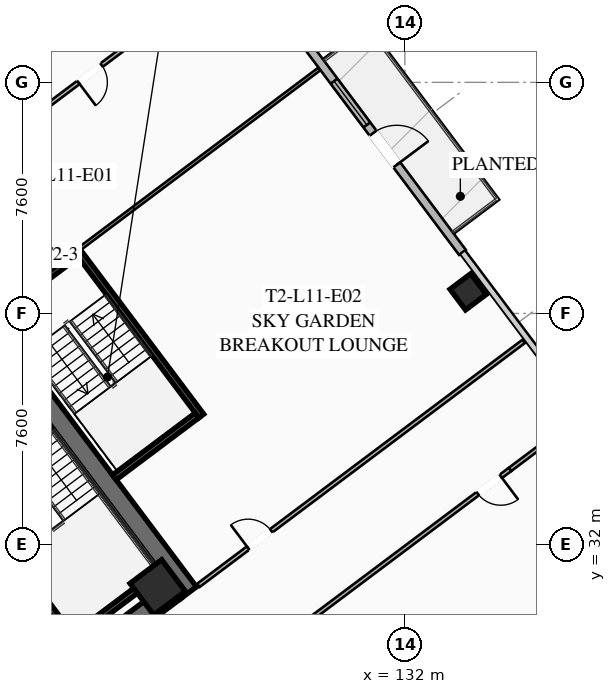
"""IFC4 building model, lengths in metres.
Left out: names, types, materials, properties, quantities, classifications, styles, units other than length and angle.
Written with IfcOpenShell. Run it as: python <this file> out.ifc"""

import sys

from ifc_helpers import new_model, si_unit, direction, frame, frame_2d, origin, origin_2d, place, context, subcontext, project, spatial, rectangle, hollow_rectangle, extrude, element, fill, save


model = new_model("IFC4")
c1 = context("Model", 3, precision=1e-05, world=origin(), true_north=direction((0.0, 1.0)))
c2 = subcontext(c1, "Body", "Model", "MODEL_VIEW")
j1 = project(units=[si_unit("LENGTHUNIT", "METRE"), si_unit("PLANEANGLEUNIT", "RADIAN")], contexts=[c1])
p1 = place(None, origin())
s1 = spatial("IfcSite", under=j1, at=p1, CompositionType="ELEMENT")
p2 = place(p1, origin())
s2 = spatial("IfcBuilding", under=s1, at=p2, CompositionType="ELEMENT")
p3 = place(p2, frame((0.0, 0.0, 45.9)))
s3 = spatial("IfcBuildingStorey", under=s2, at=p3, CompositionType="ELEMENT", Elevation=45.9)
p4 = place(p3, frame((115.524, 42.893, 0.0), z_axis=(0.0, 0.0, 1.0), x_axis=(0.600005007985, -0.799996243986, 0.0)))
e1 = element("IfcWall", 1, at=p4, inside=s3, PredefinedType="SHEAR", context=c2, shape_type="SweptSolid", body=[
    extrude(rectangle(XDim=15.6, YDim=0.65, at=frame_2d((7.8, 0.0))), origin(), (0.0, 0.0, 1.0), 3.55),
])
p5 = place(p3, frame((124.429, 30.478, 0.0), z_axis=(0.0, 0.0, 1.0), x_axis=(-0.799998028465, -0.600002628705, 0.0)))
e2 = element("IfcWall", 2, at=p5, inside=s3, PredefinedType="SHEAR", context=c2, shape_type="SweptSolid", body=[
    extrude(rectangle(XDim=14.86, YDim=0.65, at=frame_2d((7.43, 0.0))), origin(), (0.0, 0.0, 1.0), 3.55),
])
p6 = place(p5, frame((9.13, 0.0, 0.0)))
e3 = element("IfcOpeningElement", 3, at=p6, cuts=e2, PredefinedType="OPENING", context=c2, shape_type="SweptSolid", body=[
    extrude(rectangle(XDim=1.25, YDim=2.25, at=frame_2d((0.625, 1.125))), frame((0.0, 0.335, 0.0), z_axis=(0.0, -1.0, 0.0), x_axis=(1.0, 0.0, 0.0)), (0.0, 0.0, 1.0), 0.67),
])
p7 = place(p5, frame((4.08, 0.0, 0.0)))
e4 = element("IfcOpeningElement", 4, at=p7, cuts=e2, PredefinedType="OPENING", context=c2, shape_type="SweptSolid", body=[
    extrude(rectangle(XDim=1.25, YDim=2.25, at=frame_2d((0.625, 1.125))), frame((0.0, 0.335, 0.0), z_axis=(0.0, -1.0, 0.0), x_axis=(1.0, 0.0, 0.0)), (0.0, 0.0, 1.0), 0.67),
])
p8 = place(p3, frame((123.87, 30.59, 0.0), z_axis=(0.0, 0.0, 1.0), x_axis=(0.799999996291, 0.600000004945, 0.0)))
e5 = element("IfcColumn", 5, at=p8, inside=s3, PredefinedType="COLUMN", context=c2, shape_type="SweptSolid", body=[
    extrude(hollow_rectangle(XDim=1.3, YDim=1.3, WallThickness=0.05, at=origin_2d()), origin(), (0.0, 0.0, 1.0), 3.35),
])
p9 = place(p3, frame((134.08, 40.31, 0.0), z_axis=(0.0, 0.0, 1.0), x_axis=(0.799999996291, 0.600000004945, 0.0)))
e6 = element("IfcColumn", 6, at=p9, inside=s3, PredefinedType="COLUMN", context=c2, shape_type="SweptSolid", body=[
    extrude(hollow_rectangle(XDim=0.85, YDim=0.85, WallThickness=0.035, at=origin_2d()), origin(), (0.0, 0.0, 1.0), 3.35),
])
p10 = place(p3, frame((128.794, 48.408, 0.0), z_axis=(0.0, 0.0, 1.0), x_axis=(0.600004595526, -0.799996553335, 0.0)))
e7 = element("IfcWall", 7, at=p10, inside=s3, PredefinedType="SOLIDWALL", context=c2, shape_type="SweptSolid", body=[
    extrude(rectangle(XDim=8.5, YDim=0.28, at=frame_2d((4.25, 0.0))), origin(), (0.0, 0.0, 1.0), 3.35),
])
p11 = place(p10, frame((3.6, 0.0, 0.0)))
e8 = element("IfcOpeningElement", 8, at=p11, cuts=e7, PredefinedType="OPENING", context=c2, shape_type="SweptSolid", body=[
    extrude(rectangle(XDim=1.3, YDim=2.15, at=frame_2d((0.65, 1.075))), frame((0.0, 0.15, 0.0), z_axis=(0.0, -1.0, 0.0), x_axis=(1.0, 0.0, 0.0)), (0.0, 0.0, 1.0), 0.3),
])
p12 = place(p10, frame((1.46, 0.0, 0.85)))
e9 = element("IfcOpeningElement", 9, at=p12, cuts=e7, PredefinedType="OPENING", context=c2, shape_type="SweptSolid", body=[
    extrude(rectangle(XDim=1.8, YDim=1.92, at=frame_2d((0.9, 0.96))), frame((0.0, 0.15, 0.0), z_axis=(0.0, -1.0, 0.0), x_axis=(1.0, 0.0, 0.0)), (0.0, 0.0, 1.0), 0.3),
])
p13 = place(p3, frame((116.56, 34.92, 0.0), z_axis=(0.0, 0.0, 1.0), x_axis=(0.600009827119, -0.799992629566, 0.0)))
e10 = element("IfcWall", 10, at=p13, inside=s3, PredefinedType="SHEAR", context=c2, shape_type="SweptSolid", body=[
    extrude(rectangle(XDim=7.95, YDim=0.2, at=frame_2d((3.975, 0.0))), origin(), (0.0, 0.0, 1.0), 3.35),
])
p14 = place(p13, frame((0.45, 0.0, 0.0)))
e11 = element("IfcOpeningElement", 11, at=p14, cuts=e10, PredefinedType="OPENING", context=c2, shape_type="SweptSolid", body=[
    extrude(rectangle(XDim=1.15, YDim=2.2, at=frame_2d((0.575, 1.1))), frame((0.0, 0.11, 0.0), z_axis=(0.0, -1.0, 0.0), x_axis=(1.0, 0.0, 0.0)), (0.0, 0.0, 1.0), 0.22),
])
p15 = place(p3, frame((120.98, 28.86, 0.0), z_axis=(0.0, 0.0, 1.0), x_axis=(0.800039270442, 0.59994763584, 0.0)))
e12 = element("IfcWall", 12, at=p15, inside=s3, PredefinedType="SHEAR", context=c2, shape_type="SweptSolid", body=[
    extrude(rectangle(XDim=3.73, YDim=0.2, at=frame_2d((1.865, 0.0))), origin(), (0.0, 0.0, 1.0), 3.35),
])
p16 = place(p3, frame((125.304, 36.228, 0.0), z_axis=(0.0, 0.0, 1.0), x_axis=(-0.59998851072, 0.800008616831, 0.0)))
e13 = element("IfcWall", 13, at=p16, inside=s3, PredefinedType="SHEAR", context=c2, shape_type="SweptSolid", body=[
    extrude(rectangle(XDim=6.8, YDim=0.2, at=frame_2d((3.4, 0.0))), origin(), (0.0, 0.0, 1.0), 3.35),
])
p17 = place(p3, frame((121.204, 41.528, 0.0), z_axis=(0.0, 0.0, 1.0), x_axis=(-0.800017232136, -0.599977023131, 0.0)))
e14 = element("IfcWall", 14, at=p17, inside=s3, PredefinedType="SHEAR", context=c2, shape_type="SweptSolid", body=[
    extrude(rectangle(XDim=3.4, YDim=0.2, at=frame_2d((1.7, 0.0))), origin(), (0.0, 0.0, 1.0), 3.35),
])
p18 = place(p17, frame((1.975, 0.0, 0.0)))
e15 = element("IfcOpeningElement", 15, at=p18, cuts=e14, PredefinedType="OPENING", context=c2, shape_type="SweptSolid", body=[
    extrude(rectangle(XDim=1.15, YDim=2.2, at=frame_2d((0.575, 1.1))), frame((0.0, 0.11, 0.0), z_axis=(0.0, -1.0, 0.0), x_axis=(1.0, 0.0, 0.0)), (0.0, 0.0, 1.0), 0.22),
])
p19 = place(p3, frame((122.444, 34.208, 0.0), z_axis=(0.0, 0.0, 1.0), x_axis=(0.79999138319, 0.600011488909, 0.0)))
e16 = element("IfcWall", 16, at=p19, inside=s3, PredefinedType="SHEAR", context=c2, shape_type="SweptSolid", body=[
    extrude(rectangle(XDim=3.4, YDim=0.2, at=frame_2d((1.7, 0.0))), origin(), (0.0, 0.0, 1.0), 3.35),
])
p20 = place(p3, frame((98.516, 34.012, 0.0), z_axis=(0.0, 0.0, 1.0), x_axis=(0.799998035726, 0.600002619023, 0.0)))
e17 = element("IfcWall", 17, at=p20, inside=s3, PredefinedType="PARTITIONING", context=c2, shape_type="SweptSolid", body=[
    extrude(rectangle(XDim=29.83, YDim=0.135, at=frame_2d((14.915, 0.0))), origin(), (0.0, 0.0, 1.0), 2.703),
])
p21 = place(p20, frame((0.3, 0.0, 0.0)))
e18 = element("IfcOpeningElement", 18, at=p21, cuts=e17, PredefinedType="OPENING", context=c2, shape_type="SweptSolid", body=[
    extrude(rectangle(XDim=0.95, YDim=2.05, at=frame_2d((0.475, 1.025))), frame((0.0, 0.077, 0.0), z_axis=(0.0, -1.0, 0.0), x_axis=(1.0, 0.0, 0.0)), (0.0, 0.0, 1.0), 0.155),
])
p22 = place(p20, frame((10.835, 0.0, 0.0)))
e19 = element("IfcOpeningElement", 19, at=p22, cuts=e17, PredefinedType="OPENING", context=c2, shape_type="SweptSolid", body=[
    extrude(rectangle(XDim=0.95, YDim=2.05, at=frame_2d((0.475, 1.025))), frame((0.0, 0.077, 0.0), z_axis=(0.0, -1.0, 0.0), x_axis=(1.0, 0.0, 0.0)), (0.0, 0.0, 1.0), 0.155),
])
p23 = place(p20, frame((14.879, 0.0, 0.0)))
e20 = element("IfcOpeningElement", 20, at=p23, cuts=e17, PredefinedType="OPENING", context=c2, shape_type="SweptSolid", body=[
    extrude(rectangle(XDim=0.95, YDim=2.05, at=frame_2d((0.475, 1.025))), frame((0.0, 0.077, 0.0), z_axis=(0.0, -1.0, 0.0), x_axis=(1.0, 0.0, 0.0)), (0.0, 0.0, 1.0), 0.155),
])
p24 = place(p20, frame((28.58, 0.0, 0.0)))
e21 = element("IfcOpeningElement", 21, at=p24, cuts=e17, PredefinedType="OPENING", context=c2, shape_type="SweptSolid", body=[
    extrude(rectangle(XDim=0.95, YDim=2.05, at=frame_2d((0.475, 1.025))), frame((0.0, 0.077, 0.0), z_axis=(0.0, -1.0, 0.0), x_axis=(1.0, 0.0, 0.0)), (0.0, 0.0, 1.0), 0.155),
])
p25 = place(p3, frame((135.46, 34.47, 0.0), z_axis=(0.0, 0.0, 1.0), x_axis=(-0.800000982127, -0.599998690494, 0.0)))
e22 = element("IfcWall", 22, at=p25, inside=s3, PredefinedType="PARTITIONING", context=c2, shape_type="SweptSolid", body=[
    extrude(rectangle(XDim=29.83, YDim=0.135, at=frame_2d((14.915, 0.0))), origin(), (0.0, 0.0, 1.0), 2.703),
])
p26 = place(p25, frame((28.5, 0.0, 0.0)))
e23 = element("IfcOpeningElement", 23, at=p26, cuts=e22, PredefinedType="OPENING", context=c2, shape_type="SweptSolid", body=[
    extrude(rectangle(XDim=0.95, YDim=2.05, at=frame_2d((0.475, 1.025))), frame((0.0, 0.077, 0.0), z_axis=(0.0, -1.0, 0.0), x_axis=(1.0, 0.0, 0.0)), (0.0, 0.0, 1.0), 0.155),
])
p27 = place(p25, frame((17.892, 0.0, 0.0)))
e24 = element("IfcOpeningElement", 24, at=p27, cuts=e22, PredefinedType="OPENING", context=c2, shape_type="SweptSolid", body=[
    extrude(rectangle(XDim=0.95, YDim=2.05, at=frame_2d((0.475, 1.025))), frame((0.0, 0.077, 0.0), z_axis=(0.0, -1.0, 0.0), x_axis=(1.0, 0.0, 0.0)), (0.0, 0.0, 1.0), 0.155),
])
p28 = place(p25, frame((0.38, 0.0, 0.0)))
e25 = element("IfcOpeningElement", 25, at=p28, cuts=e22, PredefinedType="OPENING", context=c2, shape_type="SweptSolid", body=[
    extrude(rectangle(XDim=0.95, YDim=2.05, at=frame_2d((0.475, 1.025))), frame((0.0, 0.077, 0.0), z_axis=(0.0, -1.0, 0.0), x_axis=(1.0, 0.0, 0.0)), (0.0, 0.0, 1.0), 0.155),
])
p29 = place(p3, frame((135.46, 34.47, 0.0), z_axis=(0.0, 0.0, 1.0), x_axis=(0.799990331366, 0.600012891296, 0.0)))
e26 = element("IfcWall", 26, at=p29, inside=s3, PredefinedType="PARTITIONING", context=c2, shape_type="SweptSolid", body=[
    extrude(rectangle(XDim=3.03, YDim=0.135, at=frame_2d((1.515, 0.0))), origin(), (0.0, 0.0, 1.0), 2.703),
])
p30 = place(p3, frame((126.544, 51.158, 0.0), z_axis=(0.0, 0.0, 1.0), x_axis=(-0.799994991918, -0.600006677385, 0.0)))
e27 = element("IfcWall", 27, at=p30, inside=s3, PredefinedType="PARTITIONING", context=c2, shape_type="SweptSolid", body=[
    extrude(rectangle(XDim=11.7, YDim=0.135, at=frame_2d((5.85, 0.0))), origin(), (0.0, 0.0, 1.0), 2.703),
])
p31 = place(p30, frame((5.65, 0.0, 0.0)))
e28 = element("IfcOpeningElement", 28, at=p31, cuts=e27, PredefinedType="OPENING", context=c2, shape_type="SweptSolid", body=[
    extrude(rectangle(XDim=0.95, YDim=2.05, at=frame_2d((0.475, 1.025))), frame((0.0, 0.077, 0.0), z_axis=(0.0, -1.0, 0.0), x_axis=(1.0, 0.0, 0.0)), (0.0, 0.0, 1.0), 0.155),
])
p32 = place(p3, frame((125.208, 30.656, 0.0), z_axis=(0.0, 0.0, 1.0), x_axis=(0.800002191231, 0.599997078347, 0.0)))
e29 = element("IfcWall", 29, at=p32, inside=s3, PredefinedType="PARTITIONING", context=c2, shape_type="SweptSolid", body=[
    extrude(rectangle(XDim=13.37, YDim=0.135, at=frame_2d((6.685, 0.0))), origin(), (0.0, 0.0, 1.0), 2.703),
])
p33 = place(p32, frame((2.045, 0.0, 0.0)))
e30 = element("IfcOpeningElement", 30, at=p33, cuts=e29, PredefinedType="OPENING", context=c2, shape_type="SweptSolid", body=[
    extrude(rectangle(XDim=0.95, YDim=2.05, at=frame_2d((0.475, 1.025))), frame((0.0, 0.077, 0.0), z_axis=(0.0, -1.0, 0.0), x_axis=(1.0, 0.0, 0.0)), (0.0, 0.0, 1.0), 0.155),
])
p34 = place(p3, frame((129.184, 47.638, 0.0), z_axis=(0.0, 0.0, 1.0), x_axis=(-0.800008922773, -0.599988102785, 0.0)))
e31 = element("IfcWall", 31, at=p34, inside=s3, PredefinedType="PARTITIONING", context=c2, shape_type="SweptSolid", body=[
    extrude(rectangle(XDim=9.85, YDim=0.11, at=frame_2d((4.925, 0.0))), origin(), (0.0, 0.0, 1.0), 2.703),
])
p35 = place(p11, origin())
e32 = element("IfcDoor", 32, at=p35, inside=s3, OperationType="SINGLE_SWING_RIGHT", PredefinedType="DOOR", context=c2, shape_type="SweptSolid", body=[
    extrude(rectangle(XDim=1.3, YDim=2.15, at=frame_2d((0.65, 1.075))), frame((0.0, 0.025, 0.0), z_axis=(0.0, -1.0, 0.0), x_axis=(1.0, 0.0, 0.0)), (0.0, 0.0, 1.0), 0.05),
])
fill(e8, e32)
p36 = place(p12, origin())
e33 = element("IfcWindow", 33, at=p36, inside=s3, PartitioningType="SINGLE_PANEL", PredefinedType="WINDOW", context=c2, shape_type="SweptSolid", body=[
    extrude(rectangle(XDim=1.8, YDim=1.92, at=frame_2d((0.9, 0.96))), frame((0.0, 0.03, 0.0), z_axis=(0.0, -1.0, 0.0), x_axis=(1.0, 0.0, 0.0)), (0.0, 0.0, 1.0), 0.06),
])
fill(e9, e33)
p37 = place(p28, origin())
e34 = element("IfcDoor", 34, at=p37, inside=s3, OperationType="SINGLE_SWING_LEFT", PredefinedType="DOOR", context=c2, shape_type="SweptSolid", body=[
    extrude(rectangle(XDim=0.95, YDim=2.05, at=frame_2d((0.475, 1.025))), frame((0.0, 0.025, 0.0), z_axis=(0.0, -1.0, 0.0), x_axis=(1.0, 0.0, 0.0)), (0.0, 0.0, 1.0), 0.05),
])
fill(e25, e34)
p38 = place(p31, origin())
e35 = element("IfcDoor", 35, at=p38, inside=s3, OperationType="SINGLE_SWING_RIGHT", PredefinedType="DOOR", context=c2, shape_type="SweptSolid", body=[
    extrude(rectangle(XDim=0.95, YDim=2.05, at=frame_2d((0.475, 1.025))), frame((0.0, 0.025, 0.0), z_axis=(0.0, -1.0, 0.0), x_axis=(1.0, 0.0, 0.0)), (0.0, 0.0, 1.0), 0.05),
])
fill(e28, e35)
p39 = place(p33, origin())
e36 = element("IfcDoor", 36, at=p39, inside=s3, OperationType="SINGLE_SWING_LEFT", PredefinedType="DOOR", context=c2, shape_type="SweptSolid", body=[
    extrude(rectangle(XDim=0.95, YDim=2.05, at=frame_2d((0.475, 1.025))), frame((0.0, 0.025, 0.0), z_axis=(0.0, -1.0, 0.0), x_axis=(1.0, 0.0, 0.0)), (0.0, 0.0, 1.0), 0.05),
])
fill(e30, e36)
save(model, sys.argv[1])
